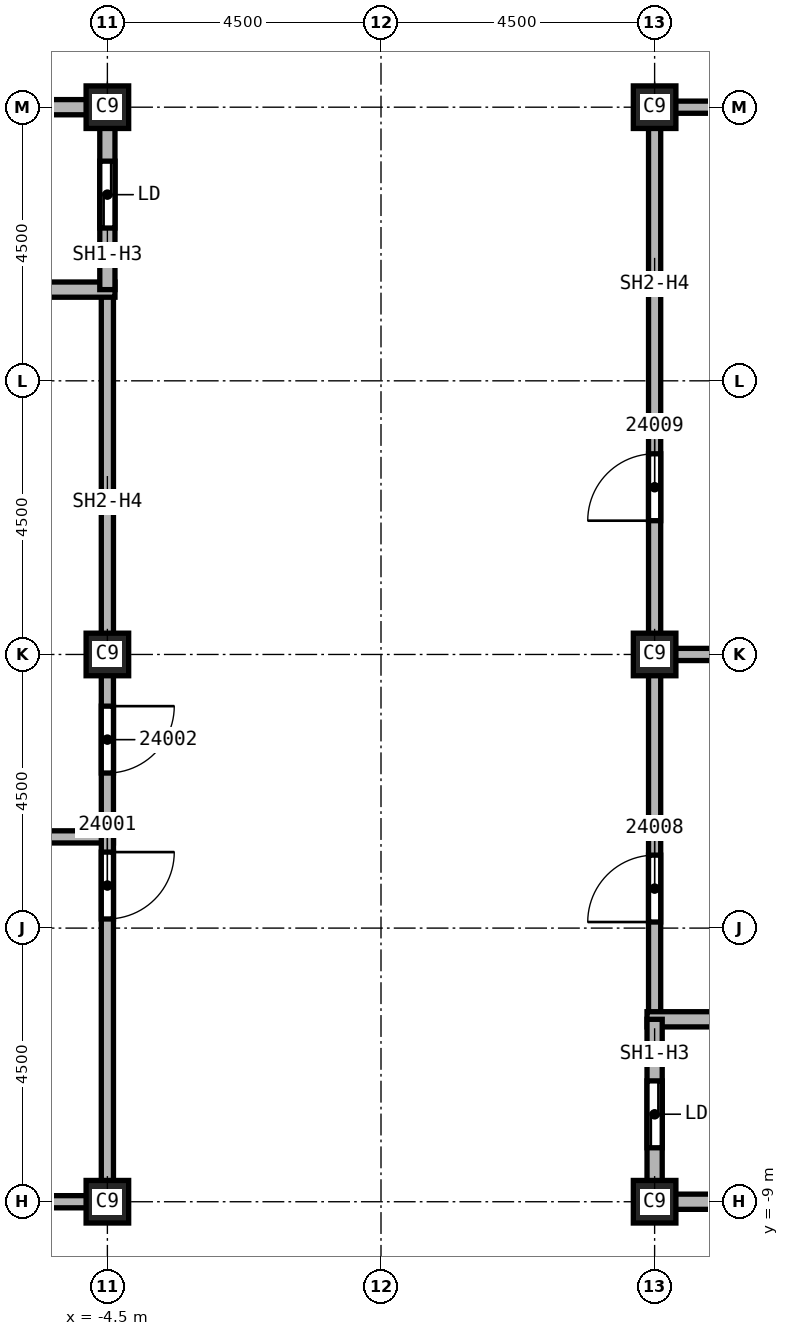
"""IFC4 building model, lengths in metres.
Left out: names, types, materials, properties, quantities, classifications, styles, units other than length and angle.
Written with IfcOpenShell. Run it as: python <this file> out.ifc"""

import sys

from ifc_helpers import new_model, si_unit, direction, frame, frame_2d, origin, origin_2d, place, context, subcontext, project, spatial, rectangle, extrude, element, fill, save


model = new_model("IFC4")
c1 = context("Model", 3, precision=1e-05, world=origin(), true_north=direction((0.0, 1.0)))
c2 = subcontext(c1, "Body", "Model", "MODEL_VIEW")
j1 = project(units=[si_unit("LENGTHUNIT", "METRE"), si_unit("PLANEANGLEUNIT", "RADIAN")], contexts=[c1])
p1 = place(None, origin())
s1 = spatial("IfcSite", under=j1, at=p1, CompositionType="ELEMENT")
p2 = place(p1, origin())
s2 = spatial("IfcBuilding", under=s1, at=p2, CompositionType="ELEMENT")
p3 = place(p2, frame((0.0, 0.0, 338.0)))
s3 = spatial("IfcBuildingStorey", under=s2, at=p3, CompositionType="ELEMENT", Elevation=338.0)
for number, where, z_axis, x_axis in (
    (1, (4.5, 0.0, 0.0), (0.0, 0.0, 1.0), (1.0, 0.0, 0.0)),
    (2, (4.5, 9.0, 0.0), (0.0, 0.0, 1.0), (1.0, 0.0, 0.0)),
    (3, (4.5, -9.0, 0.0), (0.0, 0.0, 1.0), (1.0, 0.0, 0.0)),
    (4, (-4.5, 0.0, 0.0), (0.0, 0.0, 1.0), (1.0, 0.0, 0.0)),
    (5, (-4.5, 9.0, 0.0), (0.0, 0.0, 1.0), (1.0, 0.0, 0.0)),
    (6, (-4.5, -9.0, 0.0), (0.0, 0.0, 1.0), (1.0, 0.0, 0.0)),
):
    element("IfcColumn", number, at=place(p3, frame(where, z_axis=z_axis, x_axis=x_axis)), inside=s3, PredefinedType="COLUMN", context=c2, shape_type="SweptSolid", body=[
        extrude(rectangle(XDim=0.7, YDim=0.7, at=origin_2d()), origin(), (0.0, 0.0, 1.0), 3.74),
    ])
p4 = place(p3, frame((-7.625, -3.0, 0.0), z_axis=(0.0, 0.0, 1.0), x_axis=(1.0, 0.0, 0.0)))
e7 = element("IfcWall", 7, at=p4, inside=s3, PredefinedType="SOLIDWALL", context=c2, shape_type="SweptSolid", body=[
    extrude(rectangle(XDim=3.225, YDim=0.2, at=frame_2d((1.613, 0.0))), origin(), (0.0, 0.0, 1.0), 3.74),
])
p5 = place(p3, frame((-4.5, -9.0, 0.0), z_axis=(0.0, 0.0, 1.0), x_axis=(-1.0, 0.0, 0.0)))
e8 = element("IfcWall", 8, at=p5, inside=s3, PredefinedType="SOLIDWALL", context=c2, shape_type="SweptSolid", body=[
    extrude(rectangle(XDim=3.0, YDim=0.2, at=frame_2d((1.5, 0.0))), origin(), (0.0, 0.0, 1.0), 3.062),
])
p6 = place(p3, frame((-4.5, 6.0, 0.0), z_axis=(0.0, 0.0, 1.0), x_axis=(0.0, -1.0, 0.0)))
e9 = element("IfcWall", 9, at=p6, inside=s3, PredefinedType="SOLIDWALL", context=c2, shape_type="SweptSolid", body=[
    extrude(rectangle(XDim=15.1, YDim=0.2, at=frame_2d((7.55, 0.0))), origin(), (0.0, 0.0, 1.0), 3.062),
])
p7 = place(p6, frame((9.25, 0.0, 0.0)))
e10 = element("IfcOpeningElement", 10, at=p7, cuts=e9, PredefinedType="OPENING", context=c2, shape_type="SweptSolid", body=[
    extrude(rectangle(XDim=1.1, YDim=2.1, at=frame_2d((0.55, 1.05))), frame((0.0, 0.1, 0.0), z_axis=(0.0, -1.0, 0.0), x_axis=(1.0, 0.0, 0.0)), (0.0, 0.0, 1.0), 0.2),
])
p8 = place(p6, frame((6.85, 0.0, 0.0)))
e11 = element("IfcOpeningElement", 11, at=p8, cuts=e9, PredefinedType="OPENING", context=c2, shape_type="SweptSolid", body=[
    extrude(rectangle(XDim=1.1, YDim=2.1, at=frame_2d((0.55, 1.05))), frame((0.0, 0.1, 0.0), z_axis=(0.0, -1.0, 0.0), x_axis=(1.0, 0.0, 0.0)), (0.0, 0.0, 1.0), 0.2),
])
p9 = place(p3, frame((4.4, 0.0, 0.0), z_axis=(0.0, 0.0, 1.0), x_axis=(1.0, 0.0, 0.0)))
e12 = element("IfcWall", 12, at=p9, inside=s3, PredefinedType="SOLIDWALL", context=c2, shape_type="SweptSolid", body=[
    extrude(rectangle(XDim=3.225, YDim=0.2, at=frame_2d((1.613, 0.0))), origin(), (0.0, 0.0, 1.0), 3.74),
])
p10 = place(p3, frame((4.5, -6.0, 0.0), z_axis=(0.0, 0.0, 1.0), x_axis=(0.0, 1.0, 0.0)))
e13 = element("IfcWall", 13, at=p10, inside=s3, PredefinedType="SOLIDWALL", context=c2, shape_type="SweptSolid", body=[
    extrude(rectangle(XDim=15.1, YDim=0.2, at=frame_2d((7.55, 0.0))), origin(), (0.0, 0.0, 1.0), 3.062),
])
p11 = place(p10, frame((1.6, 0.0, 0.0)))
e14 = element("IfcOpeningElement", 14, at=p11, cuts=e13, PredefinedType="OPENING", context=c2, shape_type="SweptSolid", body=[
    extrude(rectangle(XDim=1.1, YDim=2.1, at=frame_2d((0.55, 1.05))), frame((0.0, 0.1, 0.0), z_axis=(0.0, -1.0, 0.0), x_axis=(1.0, 0.0, 0.0)), (0.0, 0.0, 1.0), 0.2),
])
p12 = place(p10, frame((8.2, 0.0, 0.0)))
e15 = element("IfcOpeningElement", 15, at=p12, cuts=e13, PredefinedType="OPENING", context=c2, shape_type="SweptSolid", body=[
    extrude(rectangle(XDim=1.1, YDim=2.1, at=frame_2d((0.55, 1.05))), frame((0.0, 0.1, 0.0), z_axis=(0.0, -1.0, 0.0), x_axis=(1.0, 0.0, 0.0)), (0.0, 0.0, 1.0), 0.2),
])
p13 = place(p3, frame((4.5, 9.0, 0.0), z_axis=(0.0, 0.0, 1.0), x_axis=(1.0, 0.0, 0.0)))
e16 = element("IfcWall", 16, at=p13, inside=s3, PredefinedType="SOLIDWALL", context=c2, shape_type="SweptSolid", body=[
    extrude(rectangle(XDim=3.0, YDim=0.2, at=frame_2d((1.5, 0.0))), origin(), (0.0, 0.0, 1.0), 3.062),
])
p14 = place(p3, frame((-7.625, 6.0, 0.0), z_axis=(0.0, 0.0, 1.0), x_axis=(1.0, 0.0, 0.0)))
e17 = element("IfcWall", 17, at=p14, inside=s3, PredefinedType="SOLIDWALL", context=c2, shape_type="SweptSolid", body=[
    extrude(rectangle(XDim=3.25, YDim=0.25, at=frame_2d((1.625, 0.0))), origin(), (0.0, 0.0, 1.0), 3.74),
])
p15 = place(p3, frame((-7.5, 9.0, 0.0), z_axis=(0.0, 0.0, 1.0), x_axis=(1.0, 0.0, 0.0)))
e18 = element("IfcWall", 18, at=p15, inside=s3, PredefinedType="SOLIDWALL", context=c2, shape_type="SweptSolid", body=[
    extrude(rectangle(XDim=3.0, YDim=0.25, at=frame_2d((1.5, 0.0))), origin(), (0.0, 0.0, 1.0), 3.062),
])
p16 = place(p3, frame((-4.5, 9.125, 0.0), z_axis=(0.0, 0.0, 1.0), x_axis=(0.0, -1.0, 0.0)))
e19 = element("IfcWall", 19, at=p16, inside=s3, PredefinedType="SOLIDWALL", context=c2, shape_type="SweptSolid", body=[
    extrude(rectangle(XDim=3.125, YDim=0.25, at=frame_2d((1.562, 0.0))), origin(), (0.0, 0.0, 1.0), 3.062),
])
p17 = place(p16, frame((1.012, 0.0, 0.0)))
e20 = element("IfcOpeningElement", 20, at=p17, cuts=e19, PredefinedType="OPENING", context=c2, shape_type="SweptSolid", body=[
    extrude(rectangle(XDim=1.1, YDim=2.1, at=frame_2d((0.55, 1.05))), frame((0.0, 0.125, 0.0), z_axis=(0.0, -1.0, 0.0), x_axis=(1.0, 0.0, 0.0)), (0.0, 0.0, 1.0), 0.25),
])
p18 = place(p3, frame((4.375, -6.0, 0.0), z_axis=(0.0, 0.0, 1.0), x_axis=(1.0, 0.0, 0.0)))
e21 = element("IfcWall", 21, at=p18, inside=s3, PredefinedType="SOLIDWALL", context=c2, shape_type="SweptSolid", body=[
    extrude(rectangle(XDim=3.25, YDim=0.25, at=frame_2d((1.625, 0.0))), origin(), (0.0, 0.0, 1.0), 3.74),
])
p19 = place(p3, frame((4.5, -9.125, 0.0), z_axis=(0.0, 0.0, 1.0), x_axis=(0.0, 1.0, 0.0)))
e22 = element("IfcWall", 22, at=p19, inside=s3, PredefinedType="SOLIDWALL", context=c2, shape_type="SweptSolid", body=[
    extrude(rectangle(XDim=3.125, YDim=0.25, at=frame_2d((1.562, 0.0))), origin(), (0.0, 0.0, 1.0), 3.062),
])
p20 = place(p19, frame((1.012, 0.0, 0.0)))
e23 = element("IfcOpeningElement", 23, at=p20, cuts=e22, PredefinedType="OPENING", context=c2, shape_type="SweptSolid", body=[
    extrude(rectangle(XDim=1.1, YDim=2.1, at=frame_2d((0.55, 1.05))), frame((0.0, 0.125, 0.0), z_axis=(0.0, -1.0, 0.0), x_axis=(1.0, 0.0, 0.0)), (0.0, 0.0, 1.0), 0.25),
])
p21 = place(p3, frame((7.5, -9.0, 0.0), z_axis=(0.0, 0.0, 1.0), x_axis=(-1.0, 0.0, 0.0)))
e24 = element("IfcWall", 24, at=p21, inside=s3, PredefinedType="SOLIDWALL", context=c2, shape_type="SweptSolid", body=[
    extrude(rectangle(XDim=3.0, YDim=0.25, at=frame_2d((1.5, 0.0))), origin(), (0.0, 0.0, 1.0), 3.062),
])
p22 = place(p7, origin())
e25 = element("IfcDoor", 25, at=p22, inside=s3, OperationType="SINGLE_SWING_RIGHT", PredefinedType="DOOR", context=c2, shape_type="SweptSolid", body=[
    extrude(rectangle(XDim=1.1, YDim=2.1, at=frame_2d((0.55, 1.05))), frame((0.0, 0.025, 0.0), z_axis=(0.0, -1.0, 0.0), x_axis=(1.0, 0.0, 0.0)), (0.0, 0.0, 1.0), 0.05),
])
fill(e10, e25)
p23 = place(p8, origin())
e26 = element("IfcDoor", 26, at=p23, inside=s3, OperationType="SINGLE_SWING_LEFT", PredefinedType="DOOR", context=c2, shape_type="SweptSolid", body=[
    extrude(rectangle(XDim=1.1, YDim=2.1, at=frame_2d((0.55, 1.05))), frame((0.0, 0.025, 0.0), z_axis=(0.0, -1.0, 0.0), x_axis=(1.0, 0.0, 0.0)), (0.0, 0.0, 1.0), 0.05),
])
fill(e11, e26)
p24 = place(p11, origin())
e27 = element("IfcDoor", 27, at=p24, inside=s3, OperationType="SINGLE_SWING_LEFT", PredefinedType="DOOR", context=c2, shape_type="SweptSolid", body=[
    extrude(rectangle(XDim=1.1, YDim=2.1, at=frame_2d((0.55, 1.05))), frame((0.0, 0.025, 0.0), z_axis=(0.0, -1.0, 0.0), x_axis=(1.0, 0.0, 0.0)), (0.0, 0.0, 1.0), 0.05),
])
fill(e14, e27)
p25 = place(p12, origin())
e28 = element("IfcDoor", 28, at=p25, inside=s3, OperationType="SINGLE_SWING_RIGHT", PredefinedType="DOOR", context=c2, shape_type="SweptSolid", body=[
    extrude(rectangle(XDim=1.1, YDim=2.1, at=frame_2d((0.55, 1.05))), frame((0.0, 0.025, 0.0), z_axis=(0.0, -1.0, 0.0), x_axis=(1.0, 0.0, 0.0)), (0.0, 0.0, 1.0), 0.05),
])
fill(e15, e28)
p26 = place(p17, origin())
e29 = element("IfcDoor", 29, at=p26, inside=s3, OperationType="SLIDING_TO_LEFT", PredefinedType="DOOR", context=c2, shape_type="SweptSolid", body=[
    extrude(rectangle(XDim=1.1, YDim=2.1, at=frame_2d((0.55, 1.05))), frame((0.0, 0.025, 0.0), z_axis=(0.0, -1.0, 0.0), x_axis=(1.0, 0.0, 0.0)), (0.0, 0.0, 1.0), 0.05),
])
fill(e20, e29)
p27 = place(p20, origin())
e30 = element("IfcDoor", 30, at=p27, inside=s3, OperationType="SLIDING_TO_LEFT", PredefinedType="DOOR", context=c2, shape_type="SweptSolid", body=[
    extrude(rectangle(XDim=1.1, YDim=2.1, at=frame_2d((0.55, 1.05))), frame((0.0, 0.025, 0.0), z_axis=(0.0, -1.0, 0.0), x_axis=(1.0, 0.0, 0.0)), (0.0, 0.0, 1.0), 0.05),
])
fill(e23, e30)
save(model, sys.argv[1])
